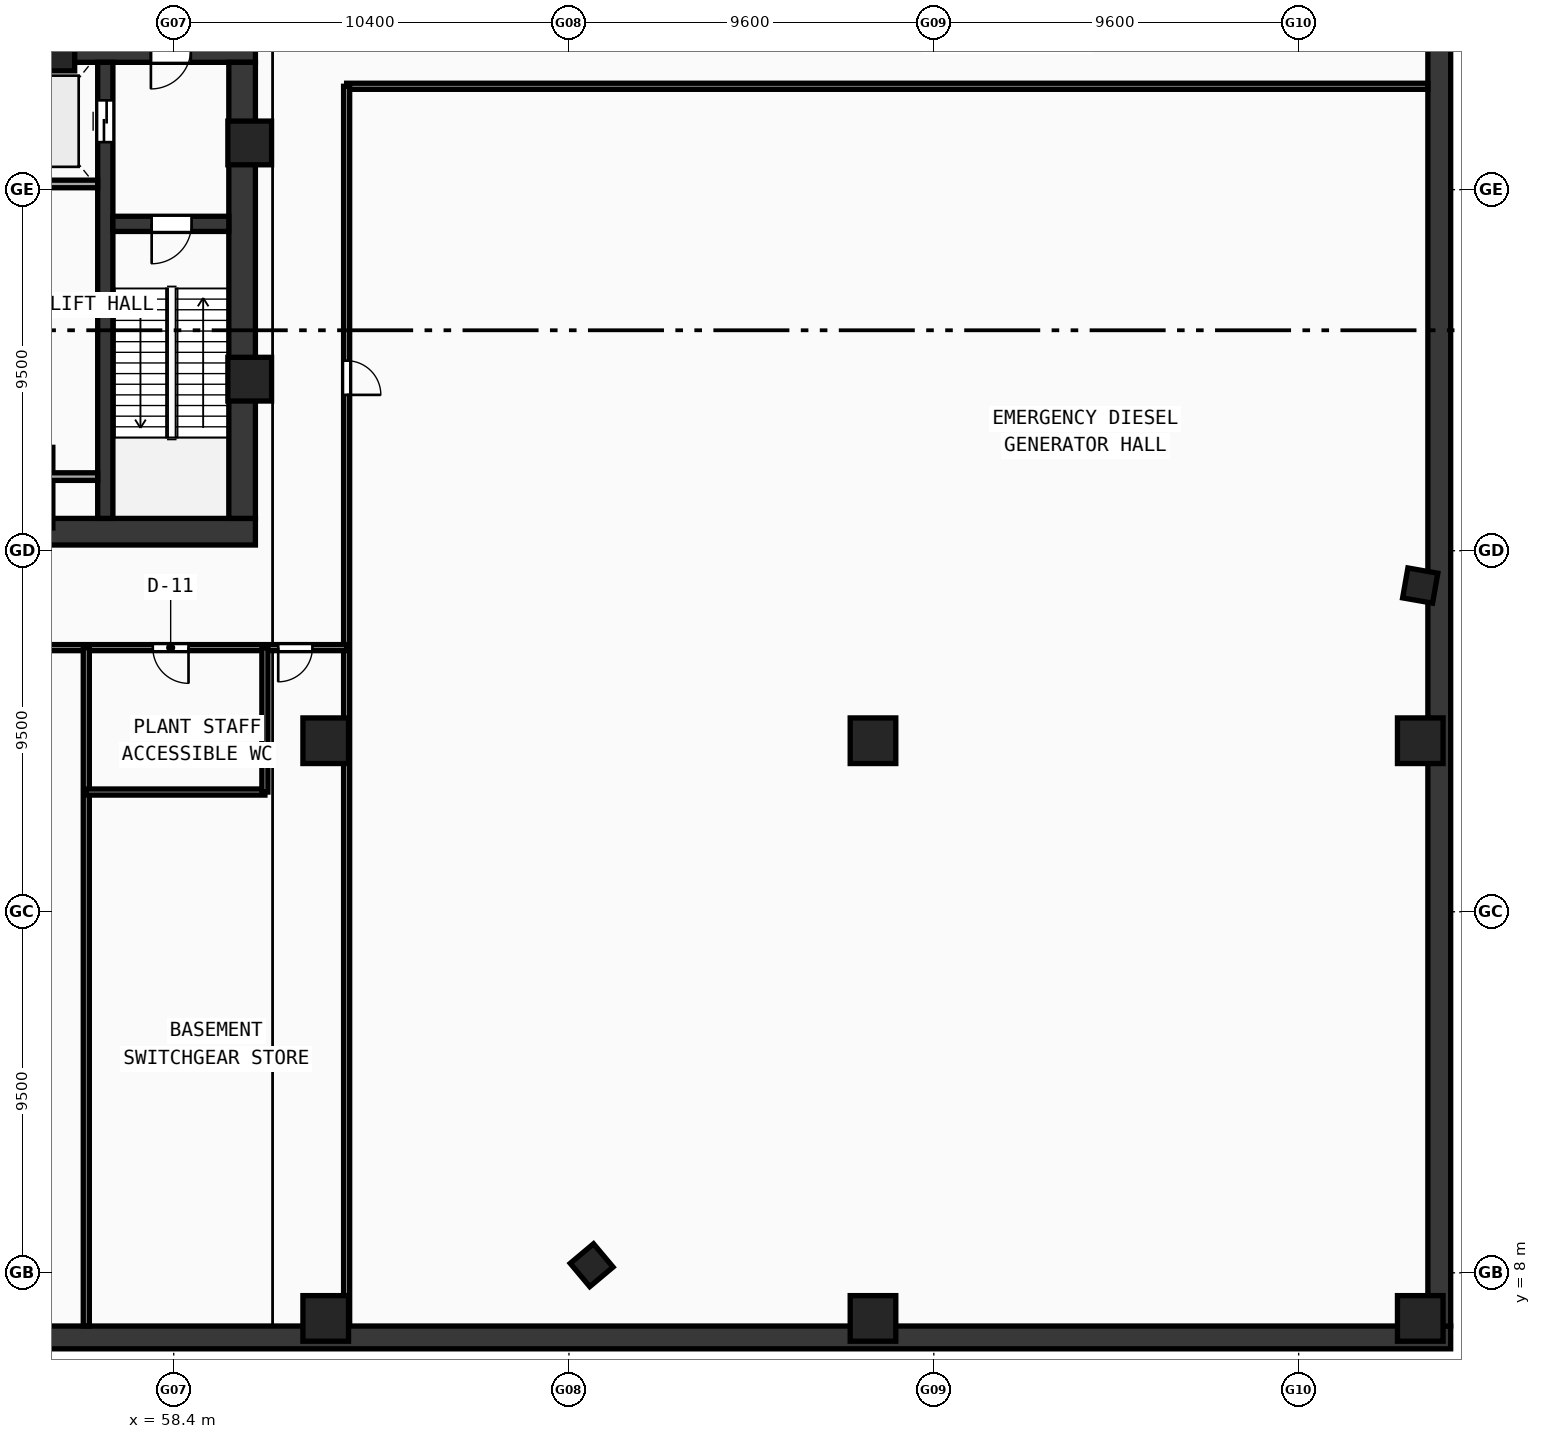
"""IFC4 building model, lengths in metres.
Left out: names, types, materials, properties, quantities, classifications, styles, units other than length and angle.
Written with IfcOpenShell. Run it as: python <this file> out.ifc"""

import sys

from ifc_helpers import new_model, si_unit, direction, frame, frame_2d, origin, origin_with_axes, origin_2d, place, context, subcontext, project, spatial, rectangle, hollow_rectangle, extrude, source, transform, mapped, element, fill, save


model = new_model("IFC4")
c1 = context("Model", 3, precision=1e-05, world=origin(), true_north=direction((0.0, 1.0)))
c2 = subcontext(c1, "Body", "Model", "MODEL_VIEW")
j1 = project(units=[si_unit("LENGTHUNIT", "METRE"), si_unit("PLANEANGLEUNIT", "RADIAN")], contexts=[c1])
p1 = place(None, origin())
s1 = spatial("IfcSite", under=j1, at=p1, CompositionType="ELEMENT")
p2 = place(p1, origin())
s2 = spatial("IfcBuilding", under=s1, at=p2, CompositionType="ELEMENT")
p3 = place(p2, frame((0.0, 0.0, -10.0)))
s3 = spatial("IfcBuildingStorey", under=s2, at=p3, CompositionType="ELEMENT", Elevation=-10.0)
p4 = place(p3, frame((4.0, 6.3, -0.6), z_axis=(0.0, 0.0, 1.0), x_axis=(1.0, 0.0, 0.0)))
e1 = element("IfcWall", 1, at=p4, inside=s3, PredefinedType="SHEAR", context=c2, shape_type="SweptSolid", body=[
    extrude(rectangle(XDim=88.0, YDim=0.6, at=frame_2d((44.0, 0.0))), origin(), (0.0, 0.0, 1.0), 5.5),
])
p5 = place(p3, frame((91.7, 6.6, -0.6), z_axis=(0.0, 0.0, 1.0), x_axis=(0.0, 1.0, 0.0)))
e2 = element("IfcWall", 2, at=p5, inside=s3, PredefinedType="SHEAR", context=c2, shape_type="SweptSolid", body=[
    extrude(rectangle(XDim=82.8, YDim=0.6, at=frame_2d((41.4, 0.0))), origin(), (0.0, 0.0, 1.0), 5.5),
])
p6 = place(p3, frame((35.45, 27.5, -0.6), z_axis=(0.0, 0.0, 1.0), x_axis=(1.0, 0.0, 0.0)))
e3 = element("IfcWall", 3, at=p6, inside=s3, PredefinedType="SHEAR", context=c2, shape_type="SweptSolid", body=[
    extrude(rectangle(XDim=25.1, YDim=0.7, at=frame_2d((12.55, 0.0))), origin(), (0.0, 0.0, 1.0), 5.5),
])
p7 = place(p3, frame((49.2, 40.2, -0.6), z_axis=(0.0, 0.0, 1.0), x_axis=(1.0, 0.0, 0.0)))
e4 = element("IfcWall", 4, at=p7, inside=s3, PredefinedType="SHEAR", context=c2, shape_type="SweptSolid", body=[
    extrude(rectangle(XDim=11.35, YDim=0.7, at=frame_2d((5.675, 0.0))), origin(), (0.0, 0.0, 1.0), 5.5),
])
p8 = place(p7, frame((8.6, 0.0, 0.6)))
e5 = element("IfcOpeningElement", 5, at=p8, cuts=e4, PredefinedType="OPENING", context=c2, shape_type="SweptSolid", body=[
    extrude(rectangle(XDim=1.05, YDim=2.1, at=frame_2d((0.525, 1.05))), frame((0.0, 0.36, 0.0), z_axis=(0.0, -1.0, 0.0), x_axis=(1.0, 0.0, 0.0)), (0.0, 0.0, 1.0), 0.72),
])
p9 = place(p3, frame((60.2, 27.85, -0.6), z_axis=(0.0, 0.0, 1.0), x_axis=(0.0, 1.0, 0.0)))
e6 = element("IfcWall", 6, at=p9, inside=s3, PredefinedType="SHEAR", context=c2, shape_type="SweptSolid", body=[
    extrude(rectangle(XDim=12.0, YDim=0.7, at=frame_2d((6.0, 0.0))), origin(), (0.0, 0.0, 1.0), 5.5),
])
p10 = place(p3, frame((56.6, 27.85, -0.6), z_axis=(0.0, 0.0, 1.0), x_axis=(0.0, 1.0, 0.0)))
e7 = element("IfcWall", 7, at=p10, inside=s3, PredefinedType="SHEAR", context=c2, shape_type="SweptSolid", body=[
    extrude(rectangle(XDim=12.0, YDim=0.4, at=frame_2d((6.0, 0.0))), origin(), (0.0, 0.0, 1.0), 5.5),
])
p11 = place(p10, frame((9.9, 0.0, 0.6)))
e8 = element("IfcOpeningElement", 8, at=p11, cuts=e7, PredefinedType="OPENING", context=c2, shape_type="SweptSolid", body=[
    extrude(rectangle(XDim=1.1, YDim=2.1, at=frame_2d((0.55, 1.05))), frame((0.0, 0.21, 0.0), z_axis=(0.0, -1.0, 0.0), x_axis=(1.0, 0.0, 0.0)), (0.0, 0.0, 1.0), 0.42),
])
p12 = place(p3, frame((56.8, 35.6, -0.6), z_axis=(0.0, 0.0, 1.0), x_axis=(1.0, 0.0, 0.0)))
e9 = element("IfcWall", 9, at=p12, inside=s3, PredefinedType="SHEAR", context=c2, shape_type="SweptSolid", body=[
    extrude(rectangle(XDim=3.05, YDim=0.4, at=frame_2d((1.525, 0.0))), origin(), (0.0, 0.0, 1.0), 5.5),
])
p13 = place(p12, frame((1.02, 0.0, 0.6)))
e10 = element("IfcOpeningElement", 10, at=p13, cuts=e9, PredefinedType="OPENING", context=c2, shape_type="SweptSolid", body=[
    extrude(rectangle(XDim=1.05, YDim=2.1, at=frame_2d((0.525, 1.05))), frame((0.0, 0.21, 0.0), z_axis=(0.0, -1.0, 0.0), x_axis=(1.0, 0.0, 0.0)), (0.0, 0.0, 1.0), 0.42),
])
m1 = source(origin(), c2, "Body", "SweptSolid", [
    extrude(hollow_rectangle(XDim=1.15, YDim=1.15, WallThickness=0.048, at=origin_2d()), origin(), (0.0, 0.0, 1.0), 5.5),
])
for number, where, z_axis, x_axis in (
    (11, (60.4, 31.513, -0.6), (0.0, 0.0, 1.0), (1.0, 0.0, 0.0)),
    (12, (60.4, 37.729, -0.6), (0.0, 0.0, 1.0), (1.0, 0.0, 0.0)),
    (13, (55.219, 40.2, -0.6), (0.0, 0.0, 1.0), (1.0, 0.0, 0.0)),
):
    element("IfcColumn", number, at=place(p3, frame(where, z_axis=z_axis, x_axis=x_axis)), inside=s3, PredefinedType="COLUMN", context=c2, shape_type="MappedRepresentation", body=[
        mapped(m1, transform((0.0, 0.0, 0.0), scale=1.0)),
    ])
m2 = source(origin(), c2, "Body", "SweptSolid", [
    extrude(hollow_rectangle(XDim=1.2, YDim=1.2, WallThickness=0.05, at=origin_2d()), origin(), (0.0, 0.0, 1.0), 5.5),
])
for number, where, z_axis, x_axis in (
    (14, (62.4, 6.8, -0.6), (0.0, 0.0, 1.0), (1.0, 0.0, 0.0)),
    (15, (62.4, 22.0, -0.6), (0.0, 0.0, 1.0), (1.0, 0.0, 0.0)),
    (16, (76.8, 6.8, -0.6), (0.0, 0.0, 1.0), (1.0, 0.0, 0.0)),
    (17, (76.8, 22.0, -0.6), (0.0, 0.0, 1.0), (1.0, 0.0, 0.0)),
    (18, (91.2, 6.8, -0.6), (0.0, 0.0, 1.0), (1.0, 0.0, 0.0)),
    (19, (91.2, 22.0, -0.6), (0.0, 0.0, 1.0), (1.0, 0.0, 0.0)),
):
    element("IfcColumn", number, at=place(p3, frame(where, z_axis=z_axis, x_axis=x_axis)), inside=s3, PredefinedType="COLUMN", context=c2, shape_type="MappedRepresentation", body=[
        mapped(m2, transform((0.0, 0.0, 0.0), scale=1.0)),
    ])
m3 = source(origin(), c2, "Body", "SweptSolid", [
    extrude(hollow_rectangle(XDim=0.8, YDim=0.8, WallThickness=0.032, at=origin_2d()), origin(), (0.0, 0.0, 1.0), 5.5),
])
for number, where, z_axis, x_axis in (
    (20, (69.397, 8.2, -0.6), (0.0, 0.0, 1.0), (0.766, 0.643, 0.0)),
    (21, (91.199, 26.083, -0.6), (0.0, 0.0, 1.0), (0.174, 0.985, 0.0)),
):
    element("IfcColumn", number, at=place(p3, frame(where, z_axis=z_axis, x_axis=x_axis)), inside=s3, PredefinedType="COLUMN", context=c2, shape_type="MappedRepresentation", body=[
        mapped(m3, transform((0.0, 0.0, 0.0), scale=1.0)),
    ])
p14 = place(p3, frame((53.68, 36.65, 0.0), z_axis=(0.0, 0.0, 1.0), x_axis=(1.0, 0.0, 0.0)))
e22 = element("IfcWall", 22, at=p14, inside=s3, PredefinedType="SOLIDWALL", context=c2, shape_type="SweptSolid", body=[
    extrude(rectangle(XDim=2.72, YDim=0.2, at=frame_2d((1.36, 0.0))), origin(), (0.0, 0.0, 1.0), 4.9),
])
p15 = place(p3, frame((55.12, 27.6, 0.0), z_axis=(0.0, 0.0, 1.0), x_axis=(0.0, 1.0, 0.0)))
e23 = element("IfcWall", 23, at=p15, inside=s3, PredefinedType="SOLIDWALL", context=c2, shape_type="SweptSolid", body=[
    extrude(rectangle(XDim=2.12, YDim=0.2, at=frame_2d((1.06, 0.0))), origin(), (0.0, 0.0, 1.0), 4.9),
])
p16 = place(p3, frame((55.12, 28.95, 0.0), z_axis=(0.0, 0.0, 1.0), x_axis=(1.0, 0.0, 0.0)))
e24 = element("IfcWall", 24, at=p16, inside=s3, PredefinedType="SOLIDWALL", context=c2, shape_type="SweptSolid", body=[
    extrude(rectangle(XDim=1.28, YDim=0.2, at=frame_2d((0.64, 0.0))), origin(), (0.0, 0.0, 1.0), 4.9),
])
p17 = place(p3, frame((62.95, 39.22, 0.0), z_axis=(0.0, 0.0, 1.0), x_axis=(1.0, 0.0, 0.0)))
e25 = element("IfcWall", 25, at=p17, inside=s3, PredefinedType="PARTITIONING", context=c2, shape_type="SweptSolid", body=[
    extrude(rectangle(XDim=28.45, YDim=0.16, at=frame_2d((14.225, 0.0))), origin(), (0.0, 0.0, 1.0), 4.0),
])
p18 = place(p3, frame((62.95, 6.6, 0.0), z_axis=(0.0, 0.0, 1.0), x_axis=(0.0, 1.0, 0.0)))
e26 = element("IfcWall", 26, at=p18, inside=s3, PredefinedType="PARTITIONING", context=c2, shape_type="SweptSolid", body=[
    extrude(rectangle(XDim=32.62, YDim=0.16, at=frame_2d((16.31, 0.0))), origin(), (0.0, 0.0, 1.0), 4.0),
])
p19 = place(p18, frame((24.5, 0.0, 0.0)))
e27 = element("IfcOpeningElement", 27, at=p19, cuts=e26, PredefinedType="OPENING", context=c2, shape_type="SweptSolid", body=[
    extrude(rectangle(XDim=0.9, YDim=2.1, at=frame_2d((0.45, 1.05))), frame((0.0, 0.09, 0.0), z_axis=(0.0, -1.0, 0.0), x_axis=(1.0, 0.0, 0.0)), (0.0, 0.0, 1.0), 0.18),
])
p20 = place(p3, frame((33.05, 24.45, 0.0), z_axis=(0.0, 0.0, 1.0), x_axis=(1.0, 0.0, 0.0)))
e28 = element("IfcWall", 28, at=p20, inside=s3, PredefinedType="PARTITIONING", context=c2, shape_type="SweptSolid", body=[
    extrude(rectangle(XDim=29.9, YDim=0.16, at=frame_2d((14.95, 0.0))), origin(), (0.0, 0.0, 1.0), 4.0),
])
p21 = place(p20, frame((10.0, 0.0, 0.0)))
e29 = element("IfcOpeningElement", 29, at=p21, cuts=e28, PredefinedType="OPENING", context=c2, shape_type="SweptSolid", body=[
    extrude(rectangle(XDim=0.9, YDim=2.1, at=frame_2d((0.45, 1.05))), frame((0.0, 0.09, 0.0), z_axis=(0.0, -1.0, 0.0), x_axis=(1.0, 0.0, 0.0)), (0.0, 0.0, 1.0), 0.18),
])
p22 = place(p20, frame((24.8, 0.0, 0.0)))
e30 = element("IfcOpeningElement", 30, at=p22, cuts=e28, PredefinedType="OPENING", context=c2, shape_type="SweptSolid", body=[
    extrude(rectangle(XDim=0.94, YDim=2.1, at=frame_2d((0.47, 1.05))), frame((0.0, 0.09, 0.0), z_axis=(0.0, -1.0, 0.0), x_axis=(1.0, 0.0, 0.0)), (0.0, 0.0, 1.0), 0.18),
])
p23 = place(p20, frame((28.1, 0.0, 0.0)))
e31 = element("IfcOpeningElement", 31, at=p23, cuts=e28, PredefinedType="OPENING", context=c2, shape_type="SweptSolid", body=[
    extrude(rectangle(XDim=0.9, YDim=2.1, at=frame_2d((0.45, 1.05))), frame((0.0, 0.09, 0.0), z_axis=(0.0, -1.0, 0.0), x_axis=(1.0, 0.0, 0.0)), (0.0, 0.0, 1.0), 0.18),
])
p24 = place(p3, frame((56.1, 6.6, 0.0), z_axis=(0.0, 0.0, 1.0), x_axis=(0.0, 1.0, 0.0)))
e32 = element("IfcWall", 32, at=p24, inside=s3, PredefinedType="PARTITIONING", context=c2, shape_type="SweptSolid", body=[
    extrude(rectangle(XDim=17.85, YDim=0.16, at=frame_2d((8.925, 0.0))), origin(), (0.0, 0.0, 1.0), 4.0),
])
p25 = place(p3, frame((56.1, 20.65, 0.0), z_axis=(0.0, 0.0, 1.0), x_axis=(1.0, 0.0, 0.0)))
e33 = element("IfcWall", 33, at=p25, inside=s3, PredefinedType="PARTITIONING", context=c2, shape_type="SweptSolid", body=[
    extrude(rectangle(XDim=4.7, YDim=0.16, at=frame_2d((2.35, 0.0))), origin(), (0.0, 0.0, 1.0), 4.9),
])
p26 = place(p3, frame((60.8, 20.65, 0.0), z_axis=(0.0, 0.0, 1.0), x_axis=(0.0, 1.0, 0.0)))
e34 = element("IfcWall", 34, at=p26, inside=s3, PredefinedType="PARTITIONING", context=c2, shape_type="SweptSolid", body=[
    extrude(rectangle(XDim=3.8, YDim=0.16, at=frame_2d((1.9, 0.0))), origin(), (0.0, 0.0, 1.0), 4.0),
])
m4 = source(origin(), c2, "Body", "SweptSolid", [
    extrude(rectangle(XDim=1.05, YDim=2.1, at=frame_2d((0.525, 1.05))), frame((0.0, 0.025, 0.0), z_axis=(0.0, -1.0, 0.0), x_axis=(1.0, 0.0, 0.0)), (0.0, 0.0, 1.0), 0.05),
])
p27 = place(p13, frame((1.05, 0.0, 0.0), z_axis=(0.0, 0.0, 1.0), x_axis=(-1.0, 0.0, 0.0)))
e35 = element("IfcDoor", 35, at=p27, inside=s3, OperationType="SINGLE_SWING_RIGHT", PredefinedType="DOOR", context=c2, shape_type="MappedRepresentation", body=[
    mapped(m4, transform((0.0, 0.0, 0.0), scale=1.0)),
])
fill(e10, e35)
m5 = source(origin(), c2, "Body", "SweptSolid", [
    extrude(rectangle(XDim=1.1, YDim=2.1, at=frame_2d((0.55, 1.05))), frame((0.0, 0.025, 0.0), z_axis=(0.0, -1.0, 0.0), x_axis=(1.0, 0.0, 0.0)), (0.0, 0.0, 1.0), 0.05),
])
p28 = place(p11, origin_with_axes())
e36 = element("IfcDoor", 36, at=p28, inside=s3, OperationType="DOUBLE_DOOR_SLIDING", PredefinedType="DOOR", context=c2, shape_type="MappedRepresentation", body=[
    mapped(m5, transform((0.0, 0.0, 0.0), scale=1.0)),
])
fill(e8, e36)
m6 = source(origin(), c2, "Body", "SweptSolid", [
    extrude(rectangle(XDim=0.9, YDim=2.1, at=frame_2d((0.45, 1.05))), frame((0.0, 0.025, 0.0), z_axis=(0.0, -1.0, 0.0), x_axis=(1.0, 0.0, 0.0)), (0.0, 0.0, 1.0), 0.05),
])
p29 = place(p19, frame((0.9, 0.0, 0.0), z_axis=(0.0, 0.0, 1.0), x_axis=(-1.0, 0.0, 0.0)))
e37 = element("IfcDoor", 37, at=p29, inside=s3, OperationType="SINGLE_SWING_RIGHT", PredefinedType="DOOR", context=c2, shape_type="MappedRepresentation", body=[
    mapped(m6, transform((0.0, 0.0, 0.0), scale=1.0)),
])
fill(e27, e37)
m7 = source(origin(), c2, "Body", "SweptSolid", [
    extrude(rectangle(XDim=0.94, YDim=2.1, at=frame_2d((0.47, 1.05))), frame((0.0, 0.025, 0.0), z_axis=(0.0, -1.0, 0.0), x_axis=(1.0, 0.0, 0.0)), (0.0, 0.0, 1.0), 0.05),
])
p30 = place(p22, frame((0.94, 0.0, 0.0), z_axis=(0.0, 0.0, 1.0), x_axis=(-1.0, 0.0, 0.0)))
e38 = element("IfcDoor", 38, at=p30, inside=s3, OperationType="SINGLE_SWING_LEFT", PredefinedType="DOOR", context=c2, shape_type="MappedRepresentation", body=[
    mapped(m7, transform((0.0, 0.0, 0.0), scale=1.0)),
])
fill(e30, e38)
p31 = place(p23, frame((0.9, 0.0, 0.0), z_axis=(0.0, 0.0, 1.0), x_axis=(-1.0, 0.0, 0.0)))
e39 = element("IfcDoor", 39, at=p31, inside=s3, OperationType="SINGLE_SWING_RIGHT", PredefinedType="DOOR", context=c2, shape_type="MappedRepresentation", body=[
    mapped(m6, transform((0.0, 0.0, 0.0), scale=1.0)),
])
fill(e31, e39)
save(model, sys.argv[1])
